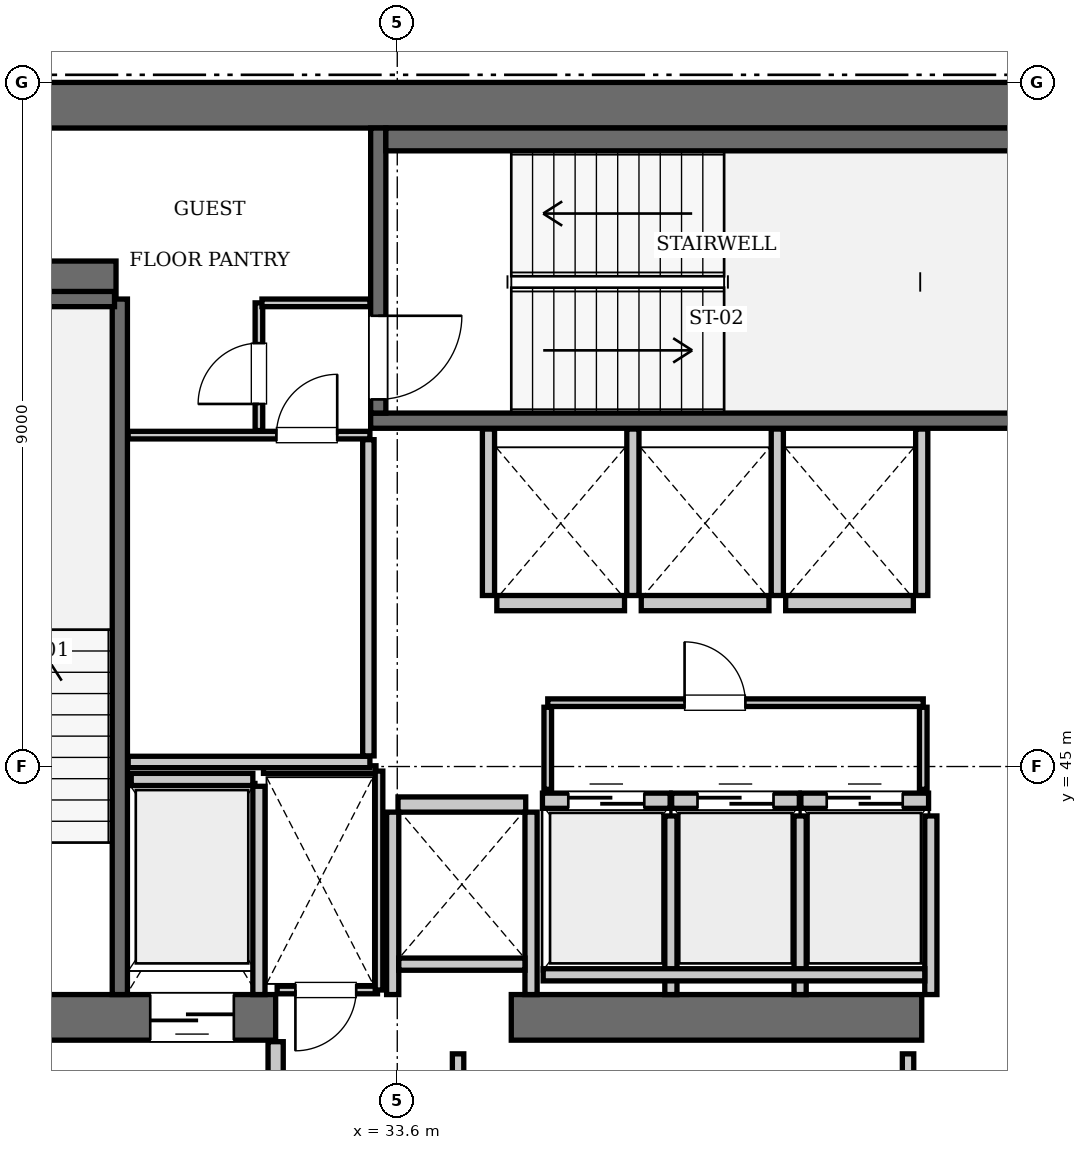
"""IFC4 building model, lengths in metres.
Left out: names, types, materials, properties, quantities, classifications, styles, units other than length and angle.
Written with IfcOpenShell. Run it as: python <this file> out.ifc"""

import sys

from ifc_helpers import new_model, si_unit, direction, frame, frame_2d, origin, place, context, subcontext, project, spatial, rectangle, extrude, element, fill, save


model = new_model("IFC4")
c1 = context("Model", 3, precision=1e-05, world=origin(), true_north=direction((0.0, 1.0)))
c2 = subcontext(c1, "Body", "Model", "MODEL_VIEW")
j1 = project(units=[si_unit("LENGTHUNIT", "METRE"), si_unit("PLANEANGLEUNIT", "RADIAN")], contexts=[c1])
p1 = place(None, origin())
s1 = spatial("IfcSite", under=j1, at=p1, CompositionType="ELEMENT")
p2 = place(p1, origin())
s2 = spatial("IfcBuilding", under=s1, at=p2, CompositionType="ELEMENT")
p3 = place(p2, frame((0.0, 0.0, 329.7)))
s3 = spatial("IfcBuildingStorey", under=s2, at=p3, CompositionType="ELEMENT", Elevation=329.7)
p4 = place(p3, frame((25.2, 53.7, 0.0), z_axis=(0.0, 0.0, 1.0), x_axis=(1.0, 0.0, 0.0)))
e1 = element("IfcWall", 1, at=p4, inside=s3, PredefinedType="SHEAR", context=c2, shape_type="SweptSolid", body=[
    extrude(rectangle(XDim=25.2, YDim=0.6, at=frame_2d((12.6, 0.0))), origin(), (0.0, 0.0, 1.0), 3.85),
])
p5 = place(p3, frame((25.2, 41.7, 0.0), z_axis=(0.0, 0.0, 1.0), x_axis=(1.0, 0.0, 0.0)))
e2 = element("IfcWall", 2, at=p5, inside=s3, PredefinedType="SHEAR", context=c2, shape_type="SweptSolid", body=[
    extrude(rectangle(XDim=6.8, YDim=0.6, at=frame_2d((3.4, 0.0))), origin(), (0.0, 0.0, 1.0), 3.85),
])
p6 = place(p5, frame((1.65, 0.0, 0.0)))
e3 = element("IfcOpeningElement", 3, at=p6, cuts=e2, PredefinedType="OPENING", context=c2, shape_type="SweptSolid", body=[
    extrude(rectangle(XDim=1.15, YDim=2.15, at=frame_2d((0.575, 1.075))), frame((0.0, 0.31, 0.0), z_axis=(0.0, -1.0, 0.0), x_axis=(1.0, 0.0, 0.0)), (0.0, 0.0, 1.0), 0.62),
])
p7 = place(p5, frame((5.15, 0.0, 0.0)))
e4 = element("IfcOpeningElement", 4, at=p7, cuts=e2, PredefinedType="OPENING", context=c2, shape_type="SweptSolid", body=[
    extrude(rectangle(XDim=1.1, YDim=2.2, at=frame_2d((0.55, 1.1))), frame((0.0, 0.31, 0.0), z_axis=(0.0, -1.0, 0.0), x_axis=(1.0, 0.0, 0.0)), (0.0, 0.0, 1.0), 0.62),
])
p8 = place(p3, frame((35.1, 41.7, 0.0), z_axis=(0.0, 0.0, 1.0), x_axis=(1.0, 0.0, 0.0)))
e5 = element("IfcWall", 5, at=p8, inside=s3, PredefinedType="SHEAR", context=c2, shape_type="SweptSolid", body=[
    extrude(rectangle(XDim=5.4, YDim=0.6, at=frame_2d((2.7, 0.0))), origin(), (0.0, 0.0, 1.0), 3.85),
])
p9 = place(p3, frame((25.8, 51.4, 0.0), z_axis=(0.0, 0.0, 1.0), x_axis=(1.0, 0.0, 0.0)))
e6 = element("IfcWall", 6, at=p9, inside=s3, PredefinedType="SHEAR", context=c2, shape_type="SweptSolid", body=[
    extrude(rectangle(XDim=4.1, YDim=0.5, at=frame_2d((2.05, 0.0))), origin(), (0.0, 0.0, 1.0), 3.85),
])
p10 = place(p3, frame((29.95, 42.0, 0.0), z_axis=(0.0, 0.0, 1.0), x_axis=(0.0, 1.0, 0.0)))
e7 = element("IfcWall", 7, at=p10, inside=s3, PredefinedType="SOLIDWALL", context=c2, shape_type="SweptSolid", body=[
    extrude(rectangle(XDim=9.15, YDim=0.2, at=frame_2d((4.575, 0.0))), origin(), (0.0, 0.0, 1.0), 3.61),
])
p11 = place(p3, frame((26.38, 51.15, 0.0), z_axis=(0.0, 0.0, 1.0), x_axis=(1.0, 0.0, 0.0)))
e8 = element("IfcWall", 8, at=p11, inside=s3, PredefinedType="SOLIDWALL", context=c2, shape_type="SweptSolid", body=[
    extrude(rectangle(XDim=3.5, YDim=0.2, at=frame_2d((1.75, 0.0))), origin(), (0.0, 0.0, 1.0), 3.61),
])
p12 = place(p3, frame((33.25, 49.55, 0.0), z_axis=(0.0, 0.0, 1.0), x_axis=(1.0, 0.0, 0.0)))
e9 = element("IfcWall", 9, at=p12, inside=s3, PredefinedType="SOLIDWALL", context=c2, shape_type="SweptSolid", body=[
    extrude(rectangle(XDim=9.1, YDim=0.2, at=frame_2d((4.55, 0.0))), origin(), (0.0, 0.0, 1.0), 3.61),
])
p13 = place(p3, frame((33.35, 49.65, 0.0), z_axis=(0.0, 0.0, 1.0), x_axis=(0.0, 1.0, 0.0)))
e10 = element("IfcWall", 10, at=p13, inside=s3, PredefinedType="SOLIDWALL", context=c2, shape_type="SweptSolid", body=[
    extrude(rectangle(XDim=3.75, YDim=0.2, at=frame_2d((1.875, 0.0))), origin(), (0.0, 0.0, 1.0), 3.61),
])
p14 = place(p13, frame((0.18, 0.0, 0.0)))
e11 = element("IfcOpeningElement", 11, at=p14, cuts=e10, PredefinedType="OPENING", context=c2, shape_type="SweptSolid", body=[
    extrude(rectangle(XDim=1.1, YDim=2.15, at=frame_2d((0.55, 1.075))), frame((0.0, 0.11, 0.0), z_axis=(0.0, -1.0, 0.0), x_axis=(1.0, 0.0, 0.0)), (0.0, 0.0, 1.0), 0.22),
])
p15 = place(p3, frame((33.45, 53.25, 0.0), z_axis=(0.0, 0.0, 1.0), x_axis=(1.0, 0.0, 0.0)))
e12 = element("IfcWall", 12, at=p15, inside=s3, PredefinedType="SOLIDWALL", context=c2, shape_type="SweptSolid", body=[
    extrude(rectangle(XDim=8.7, YDim=0.3, at=frame_2d((4.35, 0.0))), origin(), (0.0, 0.0, 1.0), 3.61),
])
p16 = place(p3, frame((35.51, 44.55, 0.0), z_axis=(0.0, 0.0, 1.0), x_axis=(1.0, 0.0, 0.0)))
e13 = element("IfcWall", 13, at=p16, inside=s3, PredefinedType="SOLIDWALL", context=c2, shape_type="SweptSolid", body=[
    extrude(rectangle(XDim=1.68, YDim=0.2, at=frame_2d((0.84, 0.0))), origin(), (0.0, 0.0, 1.0), 3.61),
])
p17 = place(p16, frame((0.34, 0.0, 0.0)))
e14 = element("IfcOpeningElement", 14, at=p17, cuts=e13, PredefinedType="OPENING", context=c2, shape_type="SweptSolid", body=[
    extrude(rectangle(XDim=1.0, YDim=2.15, at=frame_2d((0.5, 1.075))), frame((0.0, 0.11, 0.0), z_axis=(0.0, -1.0, 0.0), x_axis=(1.0, 0.0, 0.0)), (0.0, 0.0, 1.0), 0.22),
])
p18 = place(p3, frame((37.21, 44.55, 0.0), z_axis=(0.0, 0.0, 1.0), x_axis=(1.0, 0.0, 0.0)))
e15 = element("IfcWall", 15, at=p18, inside=s3, PredefinedType="SOLIDWALL", context=c2, shape_type="SweptSolid", body=[
    extrude(rectangle(XDim=1.68, YDim=0.2, at=frame_2d((0.84, 0.0))), origin(), (0.0, 0.0, 1.0), 3.61),
])
p19 = place(p18, frame((0.34, 0.0, 0.0)))
e16 = element("IfcOpeningElement", 16, at=p19, cuts=e15, PredefinedType="OPENING", context=c2, shape_type="SweptSolid", body=[
    extrude(rectangle(XDim=1.0, YDim=2.15, at=frame_2d((0.5, 1.075))), frame((0.0, 0.11, 0.0), z_axis=(0.0, -1.0, 0.0), x_axis=(1.0, 0.0, 0.0)), (0.0, 0.0, 1.0), 0.22),
])
p20 = place(p3, frame((38.91, 44.55, 0.0), z_axis=(0.0, 0.0, 1.0), x_axis=(1.0, 0.0, 0.0)))
e17 = element("IfcWall", 17, at=p20, inside=s3, PredefinedType="SOLIDWALL", context=c2, shape_type="SweptSolid", body=[
    extrude(rectangle(XDim=1.68, YDim=0.2, at=frame_2d((0.84, 0.0))), origin(), (0.0, 0.0, 1.0), 3.61),
])
p21 = place(p20, frame((0.34, 0.0, 0.0)))
e18 = element("IfcOpeningElement", 18, at=p21, cuts=e17, PredefinedType="OPENING", context=c2, shape_type="SweptSolid", body=[
    extrude(rectangle(XDim=1.0, YDim=2.15, at=frame_2d((0.5, 1.075))), frame((0.0, 0.11, 0.0), z_axis=(0.0, -1.0, 0.0), x_axis=(1.0, 0.0, 0.0)), (0.0, 0.0, 1.0), 0.22),
])
p22 = place(p3, frame((34.91, 47.15, 0.0), z_axis=(0.0, 0.0, 1.0), x_axis=(1.0, 0.0, 0.0)))
e19 = element("IfcWall", 19, at=p22, inside=s3, PredefinedType="SOLIDWALL", context=c2, shape_type="SweptSolid", body=[
    extrude(rectangle(XDim=1.68, YDim=0.2, at=frame_2d((0.84, 0.0))), origin(), (0.0, 0.0, 1.0), 3.61),
])
for number, where, z_axis, x_axis in (
    (20, (36.81, 47.15, 0.0), (0.0, 0.0, 1.0), (1.0, 0.0, 0.0)),
    (21, (38.71, 47.15, 0.0), (0.0, 0.0, 1.0), (1.0, 0.0, 0.0)),
    (22, (33.61, 44.5, 0.0), (0.0, 0.0, 1.0), (1.0, 0.0, 0.0)),
):
    element("IfcWall", number, at=place(p3, frame(where, z_axis=z_axis, x_axis=x_axis)), inside=s3, PredefinedType="SOLIDWALL", context=c2, shape_type="SweptSolid", body=[
        extrude(rectangle(XDim=1.68, YDim=0.2, at=frame_2d((0.84, 0.0))), origin(), (0.0, 0.0, 1.0), 3.61),
    ])
p23 = place(p3, frame((30.1, 44.83, 0.0), z_axis=(0.0, 0.0, 1.0), x_axis=(1.0, 0.0, 0.0)))
e23 = element("IfcWall", 23, at=p23, inside=s3, PredefinedType="SOLIDWALL", context=c2, shape_type="SweptSolid", body=[
    extrude(rectangle(XDim=1.6, YDim=0.16, at=frame_2d((0.8, 0.0))), origin(), (0.0, 0.0, 1.0), 3.61),
])
p24 = place(p3, frame((31.78, 42.0, 0.0), z_axis=(0.0, 0.0, 1.0), x_axis=(0.0, 1.0, 0.0)))
e24 = element("IfcWall", 24, at=p24, inside=s3, PredefinedType="SOLIDWALL", context=c2, shape_type="SweptSolid", body=[
    extrude(rectangle(XDim=2.74, YDim=0.16, at=frame_2d((1.37, 0.0))), origin(), (0.0, 0.0, 1.0), 3.61),
])
for number, where, z_axis, x_axis in (
    (25, (37.2, 42.0, 0.0), (0.0, 0.0, 1.0), (0.0, 1.0, 0.0)),
    (26, (38.9, 42.0, 0.0), (0.0, 0.0, 1.0), (0.0, 1.0, 0.0)),
    (27, (40.62, 42.0, 0.0), (0.0, 0.0, 1.0), (0.0, 1.0, 0.0)),
):
    element("IfcWall", number, at=place(p3, frame(where, z_axis=z_axis, x_axis=x_axis)), inside=s3, PredefinedType="SOLIDWALL", context=c2, shape_type="SweptSolid", body=[
        extrude(rectangle(XDim=2.35, YDim=0.16, at=frame_2d((1.175, 0.0))), origin(), (0.0, 0.0, 1.0), 3.61),
    ])
p25 = place(p3, frame((35.52, 42.26, 0.0), z_axis=(0.0, 0.0, 1.0), x_axis=(1.0, 0.0, 0.0)))
e28 = element("IfcWall", 28, at=p25, inside=s3, PredefinedType="SOLIDWALL", context=c2, shape_type="SweptSolid", body=[
    extrude(rectangle(XDim=5.02, YDim=0.16, at=frame_2d((2.51, 0.0))), origin(), (0.0, 0.0, 1.0), 3.61),
])
for number, where, z_axis, x_axis in (
    (29, (34.8, 47.25, 0.0), (0.0, 0.0, 1.0), (0.0, 1.0, 0.0)),
    (30, (36.7, 47.25, 0.0), (0.0, 0.0, 1.0), (0.0, 1.0, 0.0)),
    (31, (38.6, 47.25, 0.0), (0.0, 0.0, 1.0), (0.0, 1.0, 0.0)),
    (32, (40.5, 47.25, 0.0), (0.0, 0.0, 1.0), (0.0, 1.0, 0.0)),
):
    element("IfcWall", number, at=place(p3, frame(where, z_axis=z_axis, x_axis=x_axis)), inside=s3, PredefinedType="SOLIDWALL", context=c2, shape_type="SweptSolid", body=[
        extrude(rectangle(XDim=2.19, YDim=0.16, at=frame_2d((1.095, 0.0))), origin(), (0.0, 0.0, 1.0), 3.61),
    ])
for number, where, z_axis, x_axis in (
    (33, (33.54, 42.0, 0.0), (0.0, 0.0, 1.0), (0.0, 1.0, 0.0)),
    (34, (35.36, 42.0, 0.0), (0.0, 0.0, 1.0), (0.0, 1.0, 0.0)),
):
    element("IfcWall", number, at=place(p3, frame(where, z_axis=z_axis, x_axis=x_axis)), inside=s3, PredefinedType="SOLIDWALL", context=c2, shape_type="SweptSolid", body=[
        extrude(rectangle(XDim=2.4, YDim=0.16, at=frame_2d((1.2, 0.0))), origin(), (0.0, 0.0, 1.0), 3.61),
    ])
p26 = place(p3, frame((33.62, 42.4, 0.0), z_axis=(0.0, 0.0, 1.0), x_axis=(1.0, 0.0, 0.0)))
e35 = element("IfcWall", 35, at=p26, inside=s3, PredefinedType="SOLIDWALL", context=c2, shape_type="SweptSolid", body=[
    extrude(rectangle(XDim=1.66, YDim=0.16, at=frame_2d((0.83, 0.0))), origin(), (0.0, 0.0, 1.0), 3.61),
])
p27 = place(p3, frame((32.0, 38.31, 0.0), z_axis=(0.0, 0.0, 1.0), x_axis=(0.0, 1.0, 0.0)))
e36 = element("IfcWall", 36, at=p27, inside=s3, PredefinedType="PARTITIONING", context=c2, shape_type="SweptSolid", body=[
    extrude(rectangle(XDim=3.07, YDim=0.2, at=frame_2d((1.535, 0.0))), origin(), (0.0, 0.0, 1.0), 3.61),
])
p28 = place(p3, frame((32.02, 42.06, 0.0), z_axis=(0.0, 0.0, 1.0), x_axis=(1.0, 0.0, 0.0)))
e37 = element("IfcWall", 37, at=p28, inside=s3, PredefinedType="PARTITIONING", context=c2, shape_type="SweptSolid", body=[
    extrude(rectangle(XDim=1.32, YDim=0.1, at=frame_2d((0.66, 0.0))), origin(), (0.0, 0.0, 1.0), 3.61),
])
p29 = place(p28, frame((0.24, 0.0, 0.0)))
e38 = element("IfcOpeningElement", 38, at=p29, cuts=e37, PredefinedType="OPENING", context=c2, shape_type="SweptSolid", body=[
    extrude(rectangle(XDim=0.8, YDim=2.05, at=frame_2d((0.4, 1.025))), frame((0.0, 0.06, 0.0), z_axis=(0.0, -1.0, 0.0), x_axis=(1.0, 0.0, 0.0)), (0.0, 0.0, 1.0), 0.12),
])
p30 = place(p3, frame((31.84, 44.96, 0.0), z_axis=(0.0, 0.0, 1.0), x_axis=(1.0, 0.0, 0.0)))
e39 = element("IfcWall", 39, at=p30, inside=s3, PredefinedType="PARTITIONING", context=c2, shape_type="SweptSolid", body=[
    extrude(rectangle(XDim=1.48, YDim=0.1, at=frame_2d((0.74, 0.0))), origin(), (0.0, 0.0, 1.0), 3.61),
])
p31 = place(p3, frame((33.36, 42.06, 0.0), z_axis=(0.0, 0.0, 1.0), x_axis=(0.0, 1.0, 0.0)))
e40 = element("IfcWall", 40, at=p31, inside=s3, PredefinedType="PARTITIONING", context=c2, shape_type="SweptSolid", body=[
    extrude(rectangle(XDim=2.88, YDim=0.1, at=frame_2d((1.44, 0.0))), origin(), (0.0, 0.0, 1.0), 3.61),
])
p32 = place(p3, frame((35.58, 45.84, 0.0), z_axis=(0.0, 0.0, 1.0), x_axis=(1.0, 0.0, 0.0)))
e41 = element("IfcWall", 41, at=p32, inside=s3, PredefinedType="PARTITIONING", context=c2, shape_type="SweptSolid", body=[
    extrude(rectangle(XDim=4.94, YDim=0.1, at=frame_2d((2.47, 0.0))), origin(), (0.0, 0.0, 1.0), 3.61),
])
p33 = place(p32, frame((1.8, 0.0, 0.0)))
e42 = element("IfcOpeningElement", 42, at=p33, cuts=e41, PredefinedType="OPENING", context=c2, shape_type="SweptSolid", body=[
    extrude(rectangle(XDim=0.8, YDim=2.05, at=frame_2d((0.4, 1.025))), frame((0.0, 0.06, 0.0), z_axis=(0.0, -1.0, 0.0), x_axis=(1.0, 0.0, 0.0)), (0.0, 0.0, 1.0), 0.12),
])
for number, where, z_axis, x_axis in (
    (43, (35.58, 44.7, 0.0), (0.0, 0.0, 1.0), (0.0, 1.0, 0.0)),
    (44, (40.52, 44.7, 0.0), (0.0, 0.0, 1.0), (0.0, 1.0, 0.0)),
):
    element("IfcWall", number, at=place(p3, frame(where, z_axis=z_axis, x_axis=x_axis)), inside=s3, PredefinedType="PARTITIONING", context=c2, shape_type="SweptSolid", body=[
        extrude(rectangle(XDim=1.08, YDim=0.1, at=frame_2d((0.54, 0.0))), origin(), (0.0, 0.0, 1.0), 3.61),
    ])
p34 = place(p3, frame((30.06, 45.06, 0.0), z_axis=(0.0, 0.0, 1.0), x_axis=(1.0, 0.0, 0.0)))
e45 = element("IfcWall", 45, at=p34, inside=s3, PredefinedType="PARTITIONING", context=c2, shape_type="SweptSolid", body=[
    extrude(rectangle(XDim=3.18, YDim=0.15, at=frame_2d((1.59, 0.0))), origin(), (0.0, 0.0, 1.0), 3.61),
])
p35 = place(p3, frame((33.22, 45.14, 0.0), z_axis=(0.0, 0.0, 1.0), x_axis=(0.0, 1.0, 0.0)))
e46 = element("IfcWall", 46, at=p35, inside=s3, PredefinedType="PARTITIONING", context=c2, shape_type="SweptSolid", body=[
    extrude(rectangle(XDim=4.16, YDim=0.15, at=frame_2d((2.08, 0.0))), origin(), (0.0, 0.0, 1.0), 3.61),
])
p36 = place(p3, frame((30.06, 49.36, 0.0), z_axis=(0.0, 0.0, 1.0), x_axis=(1.0, 0.0, 0.0)))
e47 = element("IfcWall", 47, at=p36, inside=s3, PredefinedType="PARTITIONING", context=c2, shape_type="SweptSolid", body=[
    extrude(rectangle(XDim=3.18, YDim=0.1, at=frame_2d((1.59, 0.0))), origin(), (0.0, 0.0, 1.0), 3.61),
])
p37 = place(p36, frame((1.95, 0.0, 0.0)))
e48 = element("IfcOpeningElement", 48, at=p37, cuts=e47, PredefinedType="OPENING", context=c2, shape_type="SweptSolid", body=[
    extrude(rectangle(XDim=0.8, YDim=2.05, at=frame_2d((0.4, 1.025))), frame((0.0, 0.06, 0.0), z_axis=(0.0, -1.0, 0.0), x_axis=(1.0, 0.0, 0.0)), (0.0, 0.0, 1.0), 0.12),
])
p38 = place(p3, frame((31.78, 49.42, 0.0), z_axis=(0.0, 0.0, 1.0), x_axis=(0.0, 1.0, 0.0)))
e49 = element("IfcWall", 49, at=p38, inside=s3, PredefinedType="PARTITIONING", context=c2, shape_type="SweptSolid", body=[
    extrude(rectangle(XDim=1.68, YDim=0.1, at=frame_2d((0.84, 0.0))), origin(), (0.0, 0.0, 1.0), 3.61),
])
p39 = place(p38, frame((0.35, 0.0, 0.0)))
e50 = element("IfcOpeningElement", 50, at=p39, cuts=e49, PredefinedType="OPENING", context=c2, shape_type="SweptSolid", body=[
    extrude(rectangle(XDim=0.8, YDim=2.05, at=frame_2d((0.4, 1.025))), frame((0.0, 0.06, 0.0), z_axis=(0.0, -1.0, 0.0), x_axis=(1.0, 0.0, 0.0)), (0.0, 0.0, 1.0), 0.12),
])
p40 = place(p3, frame((31.82, 51.1, 0.0), z_axis=(0.0, 0.0, 1.0), x_axis=(1.0, 0.0, 0.0)))
e51 = element("IfcWall", 51, at=p40, inside=s3, PredefinedType="PARTITIONING", context=c2, shape_type="SweptSolid", body=[
    extrude(rectangle(XDim=1.42, YDim=0.1, at=frame_2d((0.71, 0.0))), origin(), (0.0, 0.0, 1.0), 3.61),
])
for number, where, z_axis, x_axis in (
    (52, (34.4, 38.38, 0.0), (0.0, 0.0, 1.0), (0.0, 1.0, 0.0)),
    (53, (40.32, 38.38, 0.0), (0.0, 0.0, 1.0), (0.0, 1.0, 0.0)),
):
    element("IfcWall", number, at=place(p3, frame(where, z_axis=z_axis, x_axis=x_axis)), inside=s3, PredefinedType="PARTITIONING", context=c2, shape_type="SweptSolid", body=[
        extrude(rectangle(XDim=2.84, YDim=0.15, at=frame_2d((1.42, 0.0))), origin(), (0.0, 0.0, 1.0), 3.61),
    ])
p41 = place(p14, frame((1.1, 0.0, 0.0), z_axis=(0.0, 0.0, 1.0), x_axis=(-1.0, 0.0, 0.0)))
e54 = element("IfcDoor", 54, at=p41, inside=s3, OperationType="SINGLE_SWING_LEFT", PredefinedType="DOOR", context=c2, shape_type="SweptSolid", body=[
    extrude(rectangle(XDim=1.1, YDim=2.15, at=frame_2d((0.55, 1.075))), frame((0.0, 0.025, 0.0), z_axis=(0.0, -1.0, 0.0), x_axis=(1.0, 0.0, 0.0)), (0.0, 0.0, 1.0), 0.05),
])
fill(e11, e54)
p42 = place(p17, origin())
e55 = element("IfcDoor", 55, at=p42, inside=s3, OperationType="SLIDING_TO_LEFT", PredefinedType="DOOR", context=c2, shape_type="SweptSolid", body=[
    extrude(rectangle(XDim=1.0, YDim=2.15, at=frame_2d((0.5, 1.075))), frame((0.0, 0.025, 0.0), z_axis=(0.0, -1.0, 0.0), x_axis=(1.0, 0.0, 0.0)), (0.0, 0.0, 1.0), 0.05),
])
fill(e14, e55)
p43 = place(p19, origin())
e56 = element("IfcDoor", 56, at=p43, inside=s3, OperationType="SLIDING_TO_LEFT", PredefinedType="DOOR", context=c2, shape_type="SweptSolid", body=[
    extrude(rectangle(XDim=1.0, YDim=2.15, at=frame_2d((0.5, 1.075))), frame((0.0, 0.025, 0.0), z_axis=(0.0, -1.0, 0.0), x_axis=(1.0, 0.0, 0.0)), (0.0, 0.0, 1.0), 0.05),
])
fill(e16, e56)
p44 = place(p21, origin())
e57 = element("IfcDoor", 57, at=p44, inside=s3, OperationType="SLIDING_TO_LEFT", PredefinedType="DOOR", context=c2, shape_type="SweptSolid", body=[
    extrude(rectangle(XDim=1.0, YDim=2.15, at=frame_2d((0.5, 1.075))), frame((0.0, 0.025, 0.0), z_axis=(0.0, -1.0, 0.0), x_axis=(1.0, 0.0, 0.0)), (0.0, 0.0, 1.0), 0.05),
])
fill(e18, e57)
p45 = place(p7, frame((1.1, 0.0, 0.0), z_axis=(0.0, 0.0, 1.0), x_axis=(-1.0, 0.0, 0.0)))
e58 = element("IfcDoor", 58, at=p45, inside=s3, OperationType="SLIDING_TO_LEFT", PredefinedType="DOOR", context=c2, shape_type="SweptSolid", body=[
    extrude(rectangle(XDim=1.1, YDim=2.2, at=frame_2d((0.55, 1.1))), frame((0.0, 0.025, 0.0), z_axis=(0.0, -1.0, 0.0), x_axis=(1.0, 0.0, 0.0)), (0.0, 0.0, 1.0), 0.05),
])
fill(e4, e58)
p46 = place(p29, frame((0.8, 0.0, 0.0), z_axis=(0.0, 0.0, 1.0), x_axis=(-1.0, 0.0, 0.0)))
e59 = element("IfcDoor", 59, at=p46, inside=s3, OperationType="SINGLE_SWING_RIGHT", PredefinedType="DOOR", context=c2, shape_type="SweptSolid", body=[
    extrude(rectangle(XDim=0.8, YDim=2.05, at=frame_2d((0.4, 1.025))), frame((0.0, 0.025, 0.0), z_axis=(0.0, -1.0, 0.0), x_axis=(1.0, 0.0, 0.0)), (0.0, 0.0, 1.0), 0.05),
])
fill(e38, e59)
p47 = place(p33, origin())
e60 = element("IfcDoor", 60, at=p47, inside=s3, OperationType="SINGLE_SWING_LEFT", PredefinedType="DOOR", context=c2, shape_type="SweptSolid", body=[
    extrude(rectangle(XDim=0.8, YDim=2.05, at=frame_2d((0.4, 1.025))), frame((0.0, 0.025, 0.0), z_axis=(0.0, -1.0, 0.0), x_axis=(1.0, 0.0, 0.0)), (0.0, 0.0, 1.0), 0.05),
])
fill(e42, e60)
p48 = place(p37, origin())
e61 = element("IfcDoor", 61, at=p48, inside=s3, OperationType="SINGLE_SWING_RIGHT", PredefinedType="DOOR", context=c2, shape_type="SweptSolid", body=[
    extrude(rectangle(XDim=0.8, YDim=2.05, at=frame_2d((0.4, 1.025))), frame((0.0, 0.025, 0.0), z_axis=(0.0, -1.0, 0.0), x_axis=(1.0, 0.0, 0.0)), (0.0, 0.0, 1.0), 0.05),
])
fill(e48, e61)
p49 = place(p39, origin())
e62 = element("IfcDoor", 62, at=p49, inside=s3, OperationType="SINGLE_SWING_LEFT", PredefinedType="DOOR", context=c2, shape_type="SweptSolid", body=[
    extrude(rectangle(XDim=0.8, YDim=2.05, at=frame_2d((0.4, 1.025))), frame((0.0, 0.025, 0.0), z_axis=(0.0, -1.0, 0.0), x_axis=(1.0, 0.0, 0.0)), (0.0, 0.0, 1.0), 0.05),
])
fill(e50, e62)
save(model, sys.argv[1])
